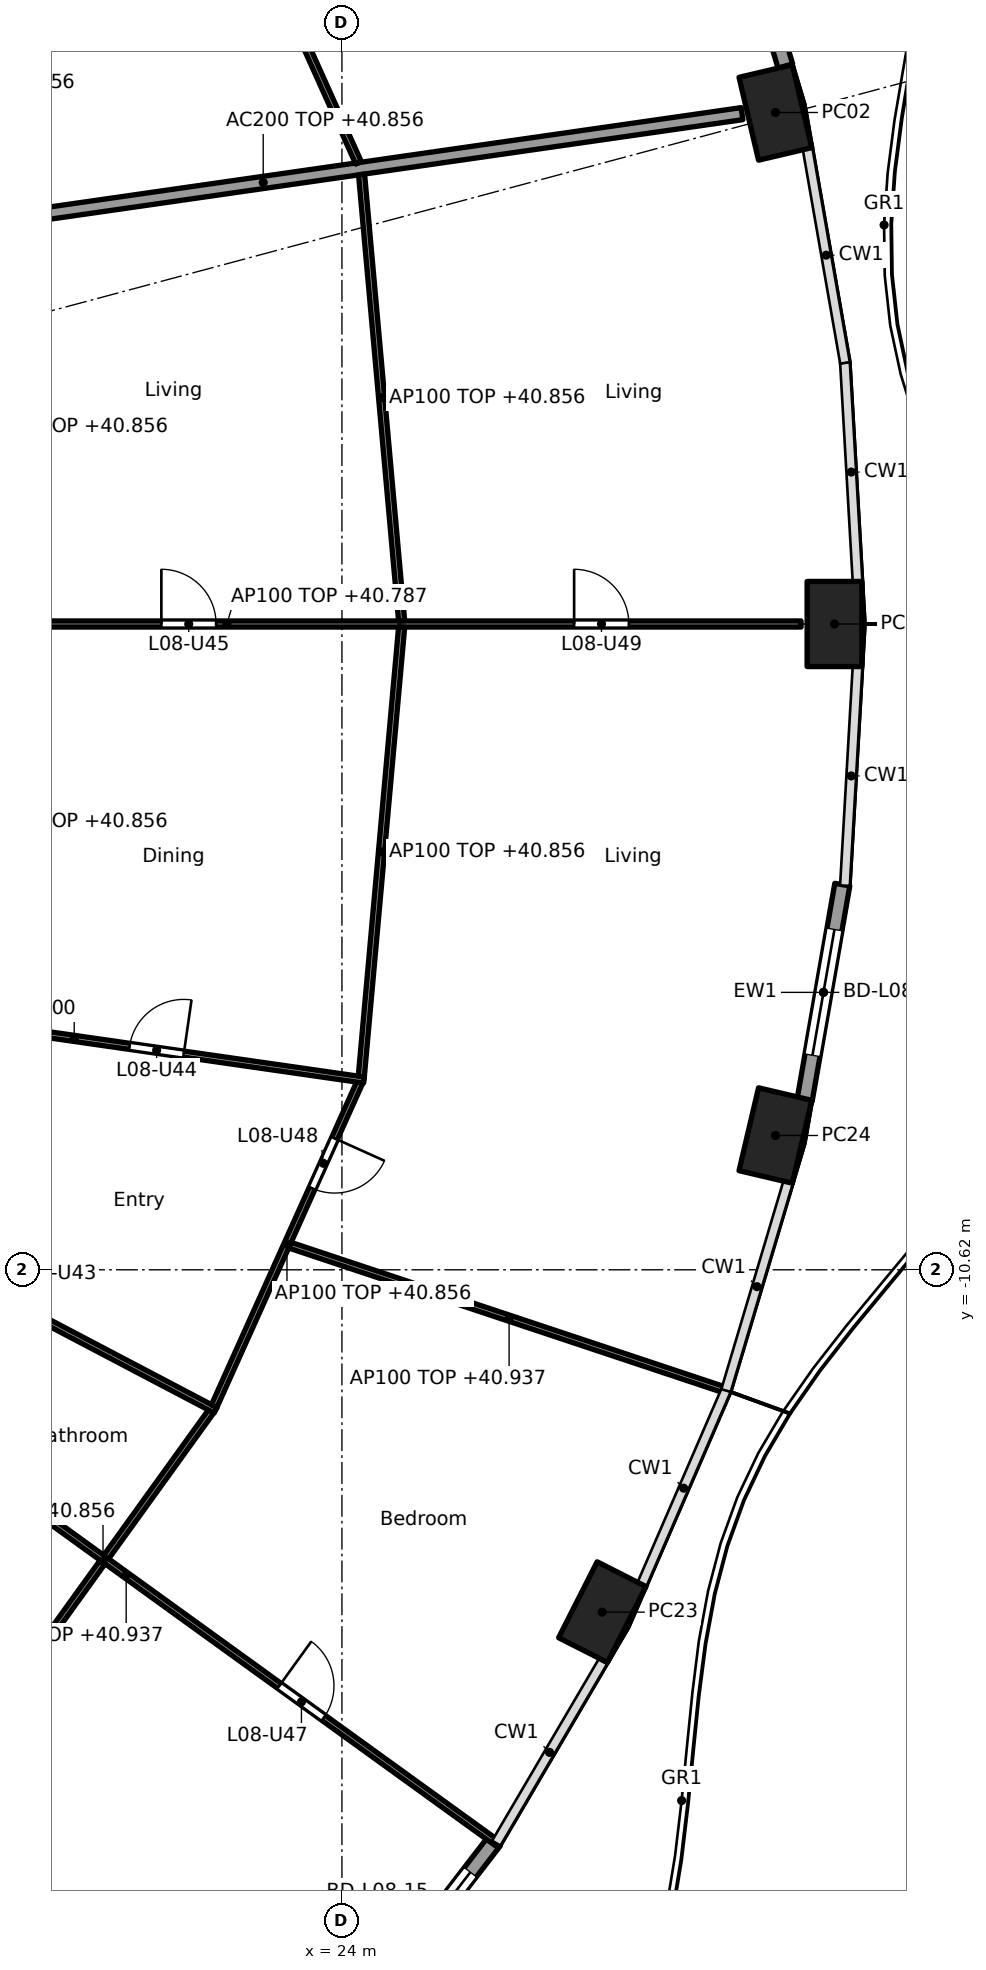
"""IFC4 building model, lengths in metres.
Left out: names, types, materials, properties, quantities, classifications, styles, units other than length and angle.
Written with IfcOpenShell. Run it as: python <this file> out.ifc"""

import sys

from ifc_helpers import new_model, si_unit, direction, frame, frame_2d, origin, origin_2d, place, context, subcontext, project, spatial, rectangle, hollow_rectangle, extrude, element, fill, save


model = new_model("IFC4")
c1 = context("Model", 3, precision=1e-05, world=origin(), true_north=direction((0.0, 1.0)))
c2 = subcontext(c1, "Body", "Model", "MODEL_VIEW")
j1 = project(units=[si_unit("LENGTHUNIT", "METRE"), si_unit("PLANEANGLEUNIT", "RADIAN")], contexts=[c1])
p1 = place(None, origin())
s1 = spatial("IfcSite", under=j1, at=p1, CompositionType="ELEMENT")
p2 = place(p1, origin())
s2 = spatial("IfcBuilding", under=s1, at=p2, CompositionType="ELEMENT")
p3 = place(p2, frame((0.0, 0.0, 38.1)))
s3 = spatial("IfcBuildingStorey", under=s2, at=p3, CompositionType="ELEMENT", Elevation=38.1)
for number, where, z_axis, x_axis in (
    (1, (32.1, 0.0, 0.0), (0.0, 0.0, 1.0), (0.0, 1.0, 0.0)),
    (2, (31.129, 8.412, 0.0), (0.0, 0.0, 1.0), (-0.229, 0.973, 0.0)),
    (3, (28.282, -16.25, 0.0), (0.0, 0.0, 1.0), (0.452, 0.892, 0.0)),
    (4, (31.129, -8.412, 0.0), (0.0, 0.0, 1.0), (0.229, 0.973, 0.0)),
):
    element("IfcColumn", number, at=place(p3, frame(where, z_axis=z_axis, x_axis=x_axis)), inside=s3, PredefinedType="COLUMN", context=c2, shape_type="SweptSolid", body=[
        extrude(hollow_rectangle(XDim=1.4, YDim=0.9, WallThickness=0.05, at=origin_2d()), origin(), (0.0, 0.0, 1.0), 3.7),
    ])
p4 = place(p3, frame((30.273, 12.593, 0.0), z_axis=(0.0, 0.0, 1.0), x_axis=(0.285871309426, -0.958268018065, 0.0)))
e5 = element("IfcWall", 5, at=p4, inside=s3, PredefinedType="SOLIDWALL", context=c2, shape_type="SweptSolid", body=[
    extrude(rectangle(XDim=3.565, YDim=0.25, at=frame_2d((1.783, 0.0))), origin(), (0.0, 0.0, 1.0), 3.44),
])
p5 = place(p4, frame((0.733, 0.0, 0.0)))
e6 = element("IfcOpeningElement", 6, at=p5, cuts=e5, PredefinedType="OPENING", context=c2, shape_type="SweptSolid", body=[
    extrude(rectangle(XDim=2.1, YDim=2.4, at=frame_2d((1.05, 1.2))), frame((0.0, 0.135, 0.0), z_axis=(0.0, -1.0, 0.0), x_axis=(1.0, 0.0, 0.0)), (0.0, 0.0, 1.0), 0.27),
])
p6 = place(p3, frame((26.508, -20.013, 0.0), z_axis=(0.0, 0.0, 1.0), x_axis=(-0.610457147657, -0.792049285635, 0.0)))
e7 = element("IfcWall", 7, at=p6, inside=s3, PredefinedType="SOLIDWALL", context=c2, shape_type="SweptSolid", body=[
    extrude(rectangle(XDim=3.397, YDim=0.25, at=frame_2d((1.699, 0.0))), origin(), (0.0, 0.0, 1.0), 3.44),
])
p7 = place(p6, frame((0.649, 0.0, 0.0)))
e8 = element("IfcOpeningElement", 8, at=p7, cuts=e7, PredefinedType="OPENING", context=c2, shape_type="SweptSolid", body=[
    extrude(rectangle(XDim=2.1, YDim=2.4, at=frame_2d((1.05, 1.2))), frame((0.0, 0.135, 0.0), z_axis=(0.0, -1.0, 0.0), x_axis=(1.0, 0.0, 0.0)), (0.0, 0.0, 1.0), 0.27),
])
p8 = place(p3, frame((32.229, -4.286, 0.0), z_axis=(0.0, 0.0, 1.0), x_axis=(-0.172217377323, -0.98505897029, 0.0)))
e9 = element("IfcWall", 9, at=p8, inside=s3, PredefinedType="SOLIDWALL", context=c2, shape_type="SweptSolid", body=[
    extrude(rectangle(XDim=3.598, YDim=0.25, at=frame_2d((1.799, 0.0))), origin(), (0.0, 0.0, 1.0), 3.44),
])
p9 = place(p8, frame((0.749, 0.0, 0.0)))
e10 = element("IfcOpeningElement", 10, at=p9, cuts=e9, PredefinedType="OPENING", context=c2, shape_type="SweptSolid", body=[
    extrude(rectangle(XDim=2.1, YDim=2.4, at=frame_2d((1.05, 1.2))), frame((0.0, 0.135, 0.0), z_axis=(0.0, -1.0, 0.0), x_axis=(1.0, 0.0, 0.0)), (0.0, 0.0, 1.0), 0.27),
])
p10 = place(p3, frame((14.832, 6.13, 0.0), z_axis=(0.0, 0.0, 1.0), x_axis=(0.989836541293, 0.142209779978, 0.0)))
e11 = element("IfcWall", 11, at=p10, inside=s3, PredefinedType="PARTITIONING", context=c2, shape_type="SweptSolid", body=[
    extrude(rectangle(XDim=15.909, YDim=0.2, at=frame_2d((7.955, 0.0))), origin(), (0.0, 0.0, 1.0), 2.756),
])
p11 = place(p3, frame((12.665, 0.0, 0.0), z_axis=(0.0, 0.0, 1.0), x_axis=(1.0, 0.0, 0.0)))
e12 = element("IfcWall", 12, at=p11, inside=s3, PredefinedType="PARTITIONING", context=c2, shape_type="SweptSolid", body=[
    extrude(rectangle(XDim=18.885, YDim=0.1, at=frame_2d((9.443, 0.0))), origin(), (0.0, 0.0, 1.0), 2.687),
])
p12 = place(p11, frame((2.205, 0.0, 0.0)))
e13 = element("IfcOpeningElement", 13, at=p12, cuts=e12, PredefinedType="OPENING", context=c2, shape_type="SweptSolid", body=[
    extrude(rectangle(XDim=0.9, YDim=2.1, at=frame_2d((0.45, 1.05))), frame((0.0, 0.06, 0.0), z_axis=(0.0, -1.0, 0.0), x_axis=(1.0, 0.0, 0.0)), (0.0, 0.0, 1.0), 0.12),
])
p13 = place(p11, frame((8.366, 0.0, 0.0)))
e14 = element("IfcOpeningElement", 14, at=p13, cuts=e12, PredefinedType="OPENING", context=c2, shape_type="SweptSolid", body=[
    extrude(rectangle(XDim=0.9, YDim=2.1, at=frame_2d((0.45, 1.05))), frame((0.0, 0.06, 0.0), z_axis=(0.0, -1.0, 0.0), x_axis=(1.0, 0.0, 0.0)), (0.0, 0.0, 1.0), 0.12),
])
p14 = place(p11, frame((15.154, 0.0, 0.0)))
e15 = element("IfcOpeningElement", 15, at=p14, cuts=e12, PredefinedType="OPENING", context=c2, shape_type="SweptSolid", body=[
    extrude(rectangle(XDim=0.9, YDim=2.1, at=frame_2d((0.45, 1.05))), frame((0.0, 0.06, 0.0), z_axis=(0.0, -1.0, 0.0), x_axis=(1.0, 0.0, 0.0)), (0.0, 0.0, 1.0), 0.12),
])
p15 = place(p3, frame((24.982, 0.05, 0.0), z_axis=(0.0, 0.0, 1.0), x_axis=(-0.08944290521, 0.995991951126, 0.0)))
e16 = element("IfcWall", 16, at=p15, inside=s3, PredefinedType="PARTITIONING", context=c2, shape_type="SweptSolid", body=[
    extrude(rectangle(XDim=7.373, YDim=0.1, at=frame_2d((3.686, 0.0))), origin(), (0.0, 0.0, 1.0), 2.756),
])
p16 = place(p3, frame((24.982, -0.05, 0.0), z_axis=(0.0, 0.0, 1.0), x_axis=(-0.089432471274, -0.995992888068, 0.0)))
e17 = element("IfcWall", 17, at=p16, inside=s3, PredefinedType="PARTITIONING", context=c2, shape_type="SweptSolid", body=[
    extrude(rectangle(XDim=7.423, YDim=0.1, at=frame_2d((3.711, 0.0))), origin(), (0.0, 0.0, 1.0), 2.756),
])
p17 = place(p3, frame((24.273, 7.584, 0.0), z_axis=(0.0, 0.0, 1.0), x_axis=(-0.410201529109, 0.911994904326, 0.0)))
e18 = element("IfcWall", 18, at=p17, inside=s3, PredefinedType="PARTITIONING", context=c2, shape_type="SweptSolid", body=[
    extrude(rectangle(XDim=5.787, YDim=0.1, at=frame_2d((2.894, 0.0))), origin(), (0.0, 0.0, 1.0), 2.756),
])
p18 = place(p17, frame((2.444, 0.0, 0.0)))
e19 = element("IfcOpeningElement", 19, at=p18, cuts=e18, PredefinedType="OPENING", context=c2, shape_type="SweptSolid", body=[
    extrude(rectangle(XDim=0.9, YDim=2.1, at=frame_2d((0.45, 1.05))), frame((0.0, 0.06, 0.0), z_axis=(0.0, -1.0, 0.0), x_axis=(1.0, 0.0, 0.0)), (0.0, 0.0, 1.0), 0.12),
])
p19 = place(p3, frame((18.293, -17.884, 0.0), z_axis=(0.0, 0.0, 1.0), x_axis=(0.584558392935, 0.811351640936, 0.0)))
e20 = element("IfcWall", 20, at=p19, inside=s3, PredefinedType="PARTITIONING", context=c2, shape_type="SweptSolid", body=[
    extrude(rectangle(XDim=6.084, YDim=0.1, at=frame_2d((3.042, 0.0))), origin(), (0.0, 0.0, 1.0), 2.756),
])
p20 = place(p3, frame((14.329, -11.221, 0.0), z_axis=(0.0, 0.0, 1.0), x_axis=(0.810671130917, -0.58550176558, 0.0)))
e21 = element("IfcWall", 21, at=p20, inside=s3, PredefinedType="PARTITIONING", context=c2, shape_type="SweptSolid", body=[
    extrude(rectangle(XDim=15.106, YDim=0.1, at=frame_2d((7.553, 0.0))), origin(), (0.0, 0.0, 1.0), 2.837),
])
p21 = place(p20, frame((10.659, 0.0, 0.0)))
e22 = element("IfcOpeningElement", 22, at=p21, cuts=e21, PredefinedType="OPENING", context=c2, shape_type="SweptSolid", body=[
    extrude(rectangle(XDim=0.9, YDim=2.1, at=frame_2d((0.45, 1.05))), frame((0.0, 0.06, 0.0), z_axis=(0.0, -1.0, 0.0), x_axis=(1.0, 0.0, 0.0)), (0.0, 0.0, 1.0), 0.12),
])
p22 = place(p3, frame((10.813, -7.091, 0.0), z_axis=(0.0, 0.0, 1.0), x_axis=(0.885182649479, -0.465243674928, 0.0)))
e23 = element("IfcWall", 23, at=p22, inside=s3, PredefinedType="PARTITIONING", context=c2, shape_type="SweptSolid", body=[
    extrude(rectangle(XDim=12.551, YDim=0.1, at=frame_2d((6.275, 0.0))), origin(), (0.0, 0.0, 1.0), 2.687),
])
p23 = place(p22, frame((0.539, 0.0, 0.0)))
e24 = element("IfcOpeningElement", 24, at=p23, cuts=e23, PredefinedType="OPENING", context=c2, shape_type="SweptSolid", body=[
    extrude(rectangle(XDim=0.9, YDim=2.1, at=frame_2d((0.45, 1.05))), frame((0.0, 0.06, 0.0), z_axis=(0.0, -1.0, 0.0), x_axis=(1.0, 0.0, 0.0)), (0.0, 0.0, 1.0), 0.12),
])
p24 = place(p22, frame((8.494, 0.0, 0.0)))
e25 = element("IfcOpeningElement", 25, at=p24, cuts=e23, PredefinedType="OPENING", context=c2, shape_type="SweptSolid", body=[
    extrude(rectangle(XDim=0.9, YDim=2.1, at=frame_2d((0.45, 1.05))), frame((0.0, 0.06, 0.0), z_axis=(0.0, -1.0, 0.0), x_axis=(1.0, 0.0, 0.0)), (0.0, 0.0, 1.0), 0.12),
])
p25 = place(p3, frame((21.899, -12.861, 0.0), z_axis=(0.0, 0.0, 1.0), x_axis=(0.410197710154, 0.911996622025, 0.0)))
e26 = element("IfcWall", 26, at=p25, inside=s3, PredefinedType="PARTITIONING", context=c2, shape_type="SweptSolid", body=[
    extrude(rectangle(XDim=5.837, YDim=0.1, at=frame_2d((2.918, 0.0))), origin(), (0.0, 0.0, 1.0), 2.756),
])
p26 = place(p25, frame((3.928, 0.0, 0.0)))
e27 = element("IfcOpeningElement", 27, at=p26, cuts=e26, PredefinedType="OPENING", context=c2, shape_type="SweptSolid", body=[
    extrude(rectangle(XDim=0.9, YDim=2.1, at=frame_2d((0.45, 1.05))), frame((0.0, 0.06, 0.0), z_axis=(0.0, -1.0, 0.0), x_axis=(1.0, 0.0, 0.0)), (0.0, 0.0, 1.0), 0.12),
])
p27 = place(p3, frame((23.144, -10.216, 0.0), z_axis=(0.0, 0.0, 1.0), x_axis=(0.948811715359, -0.315842253027, 0.0)))
e28 = element("IfcWall", 28, at=p27, inside=s3, PredefinedType="PARTITIONING", context=c2, shape_type="SweptSolid", body=[
    extrude(rectangle(XDim=7.6, YDim=0.1, at=frame_2d((3.8, 0.0))), origin(), (0.0, 0.0, 1.0), 2.837),
])
p28 = place(p3, frame((14.832, -6.13, 0.0), z_axis=(0.0, 0.0, 1.0), x_axis=(0.989837122016, -0.142205737856, 0.0)))
e29 = element("IfcWall", 29, at=p28, inside=s3, PredefinedType="PARTITIONING", context=c2, shape_type="SweptSolid", body=[
    extrude(rectangle(XDim=9.63, YDim=0.1, at=frame_2d((4.815, 0.0))), origin(), (0.0, 0.0, 1.0), 3.44),
])
p29 = place(p28, frame((1.182, 0.0, 0.0)))
e30 = element("IfcOpeningElement", 30, at=p29, cuts=e29, PredefinedType="OPENING", context=c2, shape_type="SweptSolid", body=[
    extrude(rectangle(XDim=0.9, YDim=2.1, at=frame_2d((0.45, 1.05))), frame((0.0, 0.06, 0.0), z_axis=(0.0, -1.0, 0.0), x_axis=(1.0, 0.0, 0.0)), (0.0, 0.0, 1.0), 0.12),
])
p30 = place(p28, frame((5.734, 0.0, 0.0)))
e31 = element("IfcOpeningElement", 31, at=p30, cuts=e29, PredefinedType="OPENING", context=c2, shape_type="SweptSolid", body=[
    extrude(rectangle(XDim=0.9, YDim=2.1, at=frame_2d((0.45, 1.05))), frame((0.0, 0.06, 0.0), z_axis=(0.0, -1.0, 0.0), x_axis=(1.0, 0.0, 0.0)), (0.0, 0.0, 1.0), 0.12),
])
p31 = place(p7, origin())
e32 = element("IfcDoor", 32, at=p31, inside=s3, OperationType="SLIDING_TO_LEFT", PredefinedType="DOOR", context=c2, shape_type="SweptSolid", body=[
    extrude(rectangle(XDim=2.1, YDim=2.4, at=frame_2d((1.05, 1.2))), frame((0.0, 0.025, 0.0), z_axis=(0.0, -1.0, 0.0), x_axis=(1.0, 0.0, 0.0)), (0.0, 0.0, 1.0), 0.05),
])
fill(e8, e32)
p32 = place(p9, origin())
e33 = element("IfcDoor", 33, at=p32, inside=s3, OperationType="SLIDING_TO_LEFT", PredefinedType="DOOR", context=c2, shape_type="SweptSolid", body=[
    extrude(rectangle(XDim=2.1, YDim=2.4, at=frame_2d((1.05, 1.2))), frame((0.0, 0.025, 0.0), z_axis=(0.0, -1.0, 0.0), x_axis=(1.0, 0.0, 0.0)), (0.0, 0.0, 1.0), 0.05),
])
fill(e10, e33)
p33 = place(p30, origin())
e34 = element("IfcDoor", 34, at=p33, inside=s3, OperationType="SINGLE_SWING_RIGHT", PredefinedType="DOOR", context=c2, shape_type="SweptSolid", body=[
    extrude(rectangle(XDim=0.9, YDim=2.1, at=frame_2d((0.45, 1.05))), frame((0.0, 0.025, 0.0), z_axis=(0.0, -1.0, 0.0), x_axis=(1.0, 0.0, 0.0)), (0.0, 0.0, 1.0), 0.05),
])
fill(e31, e34)
p34 = place(p13, origin())
e35 = element("IfcDoor", 35, at=p34, inside=s3, OperationType="SINGLE_SWING_LEFT", PredefinedType="DOOR", context=c2, shape_type="SweptSolid", body=[
    extrude(rectangle(XDim=0.9, YDim=2.1, at=frame_2d((0.45, 1.05))), frame((0.0, 0.025, 0.0), z_axis=(0.0, -1.0, 0.0), x_axis=(1.0, 0.0, 0.0)), (0.0, 0.0, 1.0), 0.05),
])
fill(e14, e35)
p35 = place(p21, origin())
e36 = element("IfcDoor", 36, at=p35, inside=s3, OperationType="SINGLE_SWING_LEFT", PredefinedType="DOOR", context=c2, shape_type="SweptSolid", body=[
    extrude(rectangle(XDim=0.9, YDim=2.1, at=frame_2d((0.45, 1.05))), frame((0.0, 0.025, 0.0), z_axis=(0.0, -1.0, 0.0), x_axis=(1.0, 0.0, 0.0)), (0.0, 0.0, 1.0), 0.05),
])
fill(e22, e36)
p36 = place(p26, frame((0.9, 0.0, 0.0), x_axis=(-1.0, 0.0, 0.0)))
e37 = element("IfcDoor", 37, at=p36, inside=s3, OperationType="SINGLE_SWING_LEFT", PredefinedType="DOOR", context=c2, shape_type="SweptSolid", body=[
    extrude(rectangle(XDim=0.9, YDim=2.1, at=frame_2d((0.45, 1.05))), frame((0.0, 0.025, 0.0), z_axis=(0.0, -1.0, 0.0), x_axis=(1.0, 0.0, 0.0)), (0.0, 0.0, 1.0), 0.05),
])
fill(e27, e37)
p37 = place(p14, origin())
e38 = element("IfcDoor", 38, at=p37, inside=s3, OperationType="SINGLE_SWING_LEFT", PredefinedType="DOOR", context=c2, shape_type="SweptSolid", body=[
    extrude(rectangle(XDim=0.9, YDim=2.1, at=frame_2d((0.45, 1.05))), frame((0.0, 0.025, 0.0), z_axis=(0.0, -1.0, 0.0), x_axis=(1.0, 0.0, 0.0)), (0.0, 0.0, 1.0), 0.05),
])
fill(e15, e38)
save(model, sys.argv[1])
